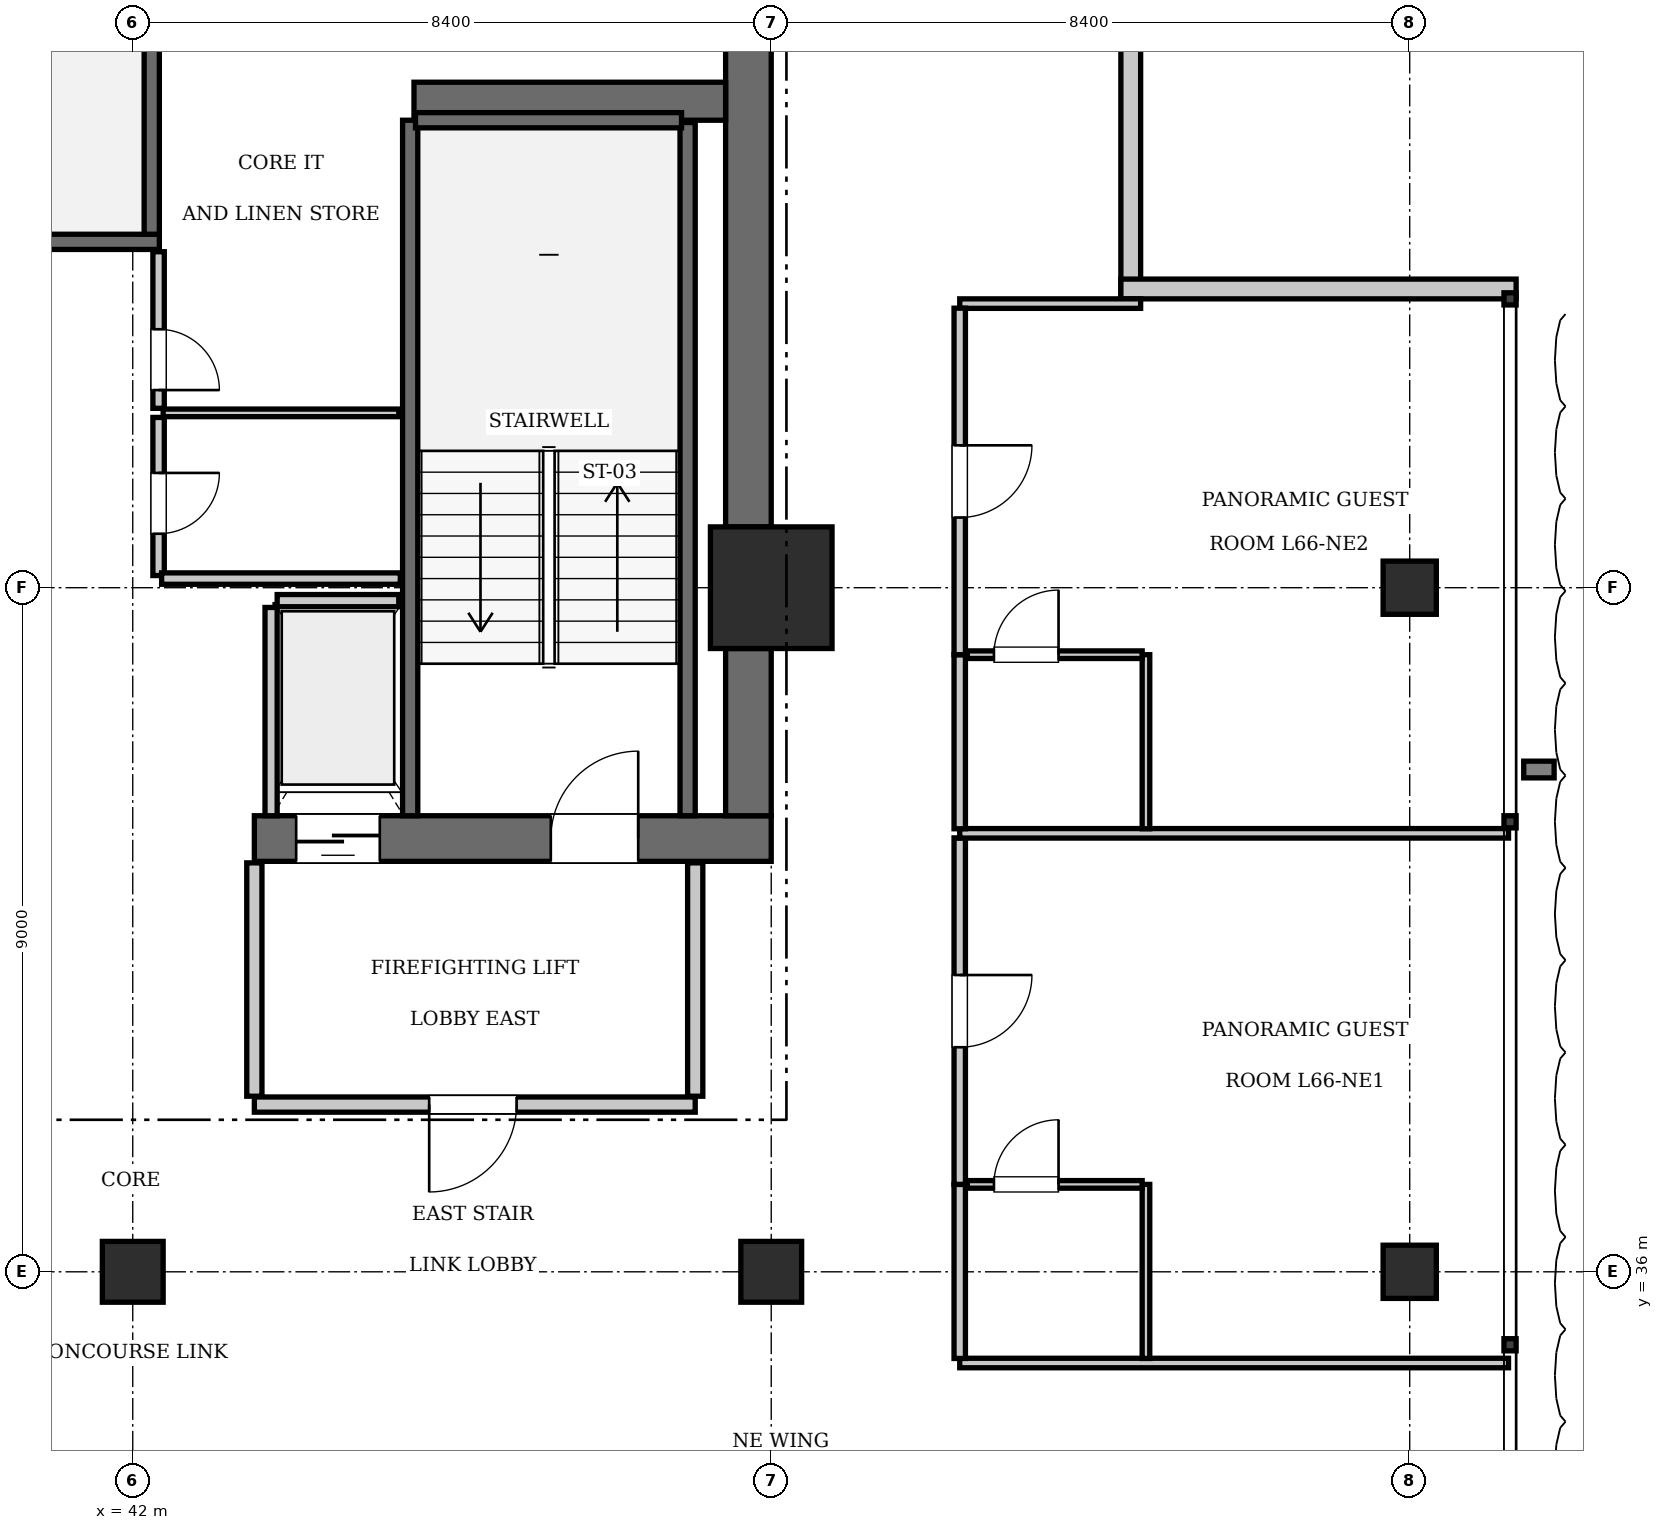
"""IFC4 building model, lengths in metres.
Left out: names, types, materials, properties, quantities, classifications, styles, units other than length and angle.
Written with IfcOpenShell. Run it as: python <this file> out.ifc"""

import sys

from ifc_helpers import new_model, si_unit, direction, frame, frame_2d, origin, origin_2d, place, context, subcontext, project, spatial, rectangle, extrude, element, fill, save


model = new_model("IFC4")
c1 = context("Model", 3, precision=1e-05, world=origin(), true_north=direction((0.0, 1.0)))
c2 = subcontext(c1, "Body", "Model", "MODEL_VIEW")
j1 = project(units=[si_unit("LENGTHUNIT", "METRE"), si_unit("PLANEANGLEUNIT", "RADIAN")], contexts=[c1])
p1 = place(None, origin())
s1 = spatial("IfcSite", under=j1, at=p1, CompositionType="ELEMENT")
p2 = place(p1, origin())
s2 = spatial("IfcBuilding", under=s1, at=p2, CompositionType="ELEMENT")
p3 = place(p2, frame((0.0, 0.0, 270.2)))
s3 = spatial("IfcBuildingStorey", under=s2, at=p3, CompositionType="ELEMENT", Elevation=270.2)
p4 = place(p3, frame((50.4, 45.0, 0.0), z_axis=(0.0, 0.0, 1.0), x_axis=(1.0, 0.0, 0.0)))
e1 = element("IfcColumn", 1, at=p4, inside=s3, PredefinedType="COLUMN", context=c2, shape_type="SweptSolid", body=[
    extrude(rectangle(XDim=1.6, YDim=1.6, at=origin_2d()), origin(), (0.0, 0.0, 1.0), 3.85),
])
p5 = place(p3, frame((43.6, 41.7, 0.0), z_axis=(0.0, 0.0, 1.0), x_axis=(1.0, 0.0, 0.0)))
e2 = element("IfcWall", 2, at=p5, inside=s3, PredefinedType="SHEAR", context=c2, shape_type="SweptSolid", body=[
    extrude(rectangle(XDim=6.8, YDim=0.6, at=frame_2d((3.4, 0.0))), origin(), (0.0, 0.0, 1.0), 3.85),
])
p6 = place(p5, frame((3.9, 0.0, 0.0)))
e3 = element("IfcOpeningElement", 3, at=p6, cuts=e2, PredefinedType="OPENING", context=c2, shape_type="SweptSolid", body=[
    extrude(rectangle(XDim=1.15, YDim=2.15, at=frame_2d((0.575, 1.075))), frame((0.0, 0.31, 0.0), z_axis=(0.0, -1.0, 0.0), x_axis=(1.0, 0.0, 0.0)), (0.0, 0.0, 1.0), 0.62),
])
p7 = place(p5, frame((0.55, 0.0, 0.0)))
e4 = element("IfcOpeningElement", 4, at=p7, cuts=e2, PredefinedType="OPENING", context=c2, shape_type="SweptSolid", body=[
    extrude(rectangle(XDim=1.1, YDim=2.2, at=frame_2d((0.55, 1.1))), frame((0.0, 0.31, 0.0), z_axis=(0.0, -1.0, 0.0), x_axis=(1.0, 0.0, 0.0)), (0.0, 0.0, 1.0), 0.62),
])
p8 = place(p3, frame((50.1, 42.0, 0.0), z_axis=(0.0, 0.0, 1.0), x_axis=(0.0, 1.0, 0.0)))
e5 = element("IfcWall", 5, at=p8, inside=s3, PredefinedType="SHEAR", context=c2, shape_type="SweptSolid", body=[
    extrude(rectangle(XDim=2.2, YDim=0.6, at=frame_2d((1.1, 0.0))), origin(), (0.0, 0.0, 1.0), 3.85),
])
p9 = place(p3, frame((50.1, 45.8, 0.0), z_axis=(0.0, 0.0, 1.0), x_axis=(0.0, 1.0, 0.0)))
e6 = element("IfcWall", 6, at=p9, inside=s3, PredefinedType="SHEAR", context=c2, shape_type="SweptSolid", body=[
    extrude(rectangle(XDim=7.6, YDim=0.6, at=frame_2d((3.8, 0.0))), origin(), (0.0, 0.0, 1.0), 3.85),
])
p10 = place(p3, frame((45.7, 51.4, 0.0), z_axis=(0.0, 0.0, 1.0), x_axis=(1.0, 0.0, 0.0)))
e7 = element("IfcWall", 7, at=p10, inside=s3, PredefinedType="SHEAR", context=c2, shape_type="SweptSolid", body=[
    extrude(rectangle(XDim=4.1, YDim=0.5, at=frame_2d((2.05, 0.0))), origin(), (0.0, 0.0, 1.0), 3.85),
])
for number, where, z_axis, x_axis in (
    (8, (42.0, 36.0, 0.0), (0.0, 0.0, 1.0), (1.0, 0.0, 0.0)),
    (9, (50.4, 36.0, 0.0), (0.0, 0.0, 1.0), (1.0, 0.0, 0.0)),
):
    element("IfcColumn", number, at=place(p3, frame(where, z_axis=z_axis, x_axis=x_axis)), inside=s3, PredefinedType="COLUMN", context=c2, shape_type="SweptSolid", body=[
        extrude(rectangle(XDim=0.8, YDim=0.8, at=origin_2d()), origin(), (0.0, 0.0, 1.0), 3.85),
    ])
for number, where, z_axis, x_axis in (
    (10, (58.8, 36.0, 0.0), (0.0, 0.0, 1.0), (1.0, 0.0, 0.0)),
    (11, (58.8, 45.0, 0.0), (0.0, 0.0, 1.0), (1.0, 0.0, 0.0)),
):
    element("IfcColumn", number, at=place(p3, frame(where, z_axis=z_axis, x_axis=x_axis)), inside=s3, PredefinedType="COLUMN", context=c2, shape_type="SweptSolid", body=[
        extrude(rectangle(XDim=0.7, YDim=0.7, at=origin_2d()), origin(), (0.0, 0.0, 1.0), 3.85),
    ])
p11 = place(p3, frame((33.25, 49.55, 0.0), z_axis=(0.0, 0.0, 1.0), x_axis=(1.0, 0.0, 0.0)))
e12 = element("IfcWall", 12, at=p11, inside=s3, PredefinedType="SOLIDWALL", context=c2, shape_type="SweptSolid", body=[
    extrude(rectangle(XDim=9.1, YDim=0.2, at=frame_2d((4.55, 0.0))), origin(), (0.0, 0.0, 1.0), 3.61),
])
p12 = place(p3, frame((42.25, 49.65, 0.0), z_axis=(0.0, 0.0, 1.0), x_axis=(0.0, 1.0, 0.0)))
e13 = element("IfcWall", 13, at=p12, inside=s3, PredefinedType="SOLIDWALL", context=c2, shape_type="SweptSolid", body=[
    extrude(rectangle(XDim=3.75, YDim=0.2, at=frame_2d((1.875, 0.0))), origin(), (0.0, 0.0, 1.0), 3.61),
])
p13 = place(p3, frame((45.65, 42.0, 0.0), z_axis=(0.0, 0.0, 1.0), x_axis=(0.0, 1.0, 0.0)))
e14 = element("IfcWall", 14, at=p13, inside=s3, PredefinedType="SOLIDWALL", context=c2, shape_type="SweptSolid", body=[
    extrude(rectangle(XDim=9.15, YDim=0.2, at=frame_2d((4.575, 0.0))), origin(), (0.0, 0.0, 1.0), 3.61),
])
p14 = place(p3, frame((49.3, 42.0, 0.0), z_axis=(0.0, 0.0, 1.0), x_axis=(0.0, 1.0, 0.0)))
e15 = element("IfcWall", 15, at=p14, inside=s3, PredefinedType="SOLIDWALL", context=c2, shape_type="SweptSolid", body=[
    extrude(rectangle(XDim=9.12, YDim=0.2, at=frame_2d((4.56, 0.0))), origin(), (0.0, 0.0, 1.0), 3.61),
])
p15 = place(p3, frame((45.72, 51.15, 0.0), z_axis=(0.0, 0.0, 1.0), x_axis=(1.0, 0.0, 0.0)))
e16 = element("IfcWall", 16, at=p15, inside=s3, PredefinedType="SOLIDWALL", context=c2, shape_type="SweptSolid", body=[
    extrude(rectangle(XDim=3.5, YDim=0.2, at=frame_2d((1.75, 0.0))), origin(), (0.0, 0.0, 1.0), 3.61),
])
p16 = place(p3, frame((43.9, 44.83, 0.0), z_axis=(0.0, 0.0, 1.0), x_axis=(1.0, 0.0, 0.0)))
e17 = element("IfcWall", 17, at=p16, inside=s3, PredefinedType="SOLIDWALL", context=c2, shape_type="SweptSolid", body=[
    extrude(rectangle(XDim=1.6, YDim=0.16, at=frame_2d((0.8, 0.0))), origin(), (0.0, 0.0, 1.0), 3.61),
])
p17 = place(p3, frame((43.82, 42.0, 0.0), z_axis=(0.0, 0.0, 1.0), x_axis=(0.0, 1.0, 0.0)))
e18 = element("IfcWall", 18, at=p17, inside=s3, PredefinedType="SOLIDWALL", context=c2, shape_type="SweptSolid", body=[
    extrude(rectangle(XDim=2.74, YDim=0.16, at=frame_2d((1.37, 0.0))), origin(), (0.0, 0.0, 1.0), 3.61),
])
for number, where, z_axis, x_axis in (
    (19, (55.13, 54.0, 0.0), (0.0, 0.0, 1.0), (0.0, -1.0, 0.0)),
    (20, (55.0, 48.93, 0.0), (0.0, 0.0, 1.0), (1.0, 0.0, 0.0)),
):
    element("IfcWall", number, at=place(p3, frame(where, z_axis=z_axis, x_axis=x_axis)), inside=s3, PredefinedType="SOLIDWALL", context=c2, shape_type="SweptSolid", body=[
        extrude(rectangle(XDim=5.2, YDim=0.26, at=frame_2d((2.6, 0.0))), origin(), (0.0, 0.0, 1.0), 3.61),
    ])
p18 = place(p3, frame((43.6, 38.2, 0.0), z_axis=(0.0, 0.0, 1.0), x_axis=(1.0, 0.0, 0.0)))
e21 = element("IfcWall", 21, at=p18, inside=s3, PredefinedType="PARTITIONING", context=c2, shape_type="SweptSolid", body=[
    extrude(rectangle(XDim=5.8, YDim=0.2, at=frame_2d((2.9, 0.0))), origin(), (0.0, 0.0, 1.0), 3.61),
])
p19 = place(p18, frame((2.3, 0.0, 0.0)))
e22 = element("IfcOpeningElement", 22, at=p19, cuts=e21, PredefinedType="OPENING", context=c2, shape_type="SweptSolid", body=[
    extrude(rectangle(XDim=1.15, YDim=2.15, at=frame_2d((0.575, 1.075))), frame((0.0, 0.11, 0.0), z_axis=(0.0, -1.0, 0.0), x_axis=(1.0, 0.0, 0.0)), (0.0, 0.0, 1.0), 0.22),
])
for number, where, z_axis, x_axis in (
    (23, (43.6, 38.31, 0.0), (0.0, 0.0, 1.0), (0.0, 1.0, 0.0)),
    (24, (49.4, 38.31, 0.0), (0.0, 0.0, 1.0), (0.0, 1.0, 0.0)),
):
    element("IfcWall", number, at=place(p3, frame(where, z_axis=z_axis, x_axis=x_axis)), inside=s3, PredefinedType="PARTITIONING", context=c2, shape_type="SweptSolid", body=[
        extrude(rectangle(XDim=3.07, YDim=0.2, at=frame_2d((1.535, 0.0))), origin(), (0.0, 0.0, 1.0), 3.61),
    ])
p20 = place(p3, frame((42.34, 45.16, 0.0), z_axis=(0.0, 0.0, 1.0), x_axis=(0.0, 1.0, 0.0)))
e25 = element("IfcWall", 25, at=p20, inside=s3, PredefinedType="PARTITIONING", context=c2, shape_type="SweptSolid", body=[
    extrude(rectangle(XDim=2.08, YDim=0.15, at=frame_2d((1.04, 0.0))), origin(), (0.0, 0.0, 1.0), 3.61),
])
p21 = place(p20, frame((0.55, 0.0, 0.0)))
e26 = element("IfcOpeningElement", 26, at=p21, cuts=e25, PredefinedType="OPENING", context=c2, shape_type="SweptSolid", body=[
    extrude(rectangle(XDim=0.8, YDim=2.05, at=frame_2d((0.4, 1.025))), frame((0.0, 0.085, 0.0), z_axis=(0.0, -1.0, 0.0), x_axis=(1.0, 0.0, 0.0)), (0.0, 0.0, 1.0), 0.17),
])
p22 = place(p3, frame((42.34, 47.36, 0.0), z_axis=(0.0, 0.0, 1.0), x_axis=(0.0, 1.0, 0.0)))
e27 = element("IfcWall", 27, at=p22, inside=s3, PredefinedType="PARTITIONING", context=c2, shape_type="SweptSolid", body=[
    extrude(rectangle(XDim=2.06, YDim=0.15, at=frame_2d((1.03, 0.0))), origin(), (0.0, 0.0, 1.0), 3.61),
])
p23 = place(p22, frame((0.24, 0.0, 0.0)))
e28 = element("IfcOpeningElement", 28, at=p23, cuts=e27, PredefinedType="OPENING", context=c2, shape_type="SweptSolid", body=[
    extrude(rectangle(XDim=0.8, YDim=2.05, at=frame_2d((0.4, 1.025))), frame((0.0, 0.085, 0.0), z_axis=(0.0, -1.0, 0.0), x_axis=(1.0, 0.0, 0.0)), (0.0, 0.0, 1.0), 0.17),
])
p24 = place(p3, frame((42.4, 47.3, 0.0), z_axis=(0.0, 0.0, 1.0), x_axis=(1.0, 0.0, 0.0)))
e29 = element("IfcWall", 29, at=p24, inside=s3, PredefinedType="PARTITIONING", context=c2, shape_type="SweptSolid", body=[
    extrude(rectangle(XDim=3.1, YDim=0.1, at=frame_2d((1.55, 0.0))), origin(), (0.0, 0.0, 1.0), 3.61),
])
p25 = place(p3, frame((42.38, 45.12, 0.0), z_axis=(0.0, 0.0, 1.0), x_axis=(1.0, 0.0, 0.0)))
e30 = element("IfcWall", 30, at=p25, inside=s3, PredefinedType="PARTITIONING", context=c2, shape_type="SweptSolid", body=[
    extrude(rectangle(XDim=3.14, YDim=0.15, at=frame_2d((1.57, 0.0))), origin(), (0.0, 0.0, 1.0), 3.61),
])
p26 = place(p3, frame((52.88, 34.8, 0.0), z_axis=(0.0, 0.0, 1.0), x_axis=(1.0, 0.0, 0.0)))
e31 = element("IfcWall", 31, at=p26, inside=s3, PredefinedType="PARTITIONING", context=c2, shape_type="SweptSolid", body=[
    extrude(rectangle(XDim=7.22, YDim=0.125, at=frame_2d((3.61, 0.0))), origin(), (0.0, 0.0, 1.0), 3.61),
])
p27 = place(p3, frame((52.88, 48.738, 0.0), z_axis=(0.0, 0.0, 1.0), x_axis=(1.0, 0.0, 0.0)))
e32 = element("IfcWall", 32, at=p27, inside=s3, PredefinedType="PARTITIONING", context=c2, shape_type="SweptSolid", body=[
    extrude(rectangle(XDim=2.38, YDim=0.125, at=frame_2d((1.19, 0.0))), origin(), (0.0, 0.0, 1.0), 3.61),
])
p28 = place(p3, frame((52.88, 34.86, 0.0), z_axis=(0.0, 0.0, 1.0), x_axis=(0.0, 1.0, 0.0)))
e33 = element("IfcWall", 33, at=p28, inside=s3, PredefinedType="PARTITIONING", context=c2, shape_type="SweptSolid", body=[
    extrude(rectangle(XDim=2.29, YDim=0.15, at=frame_2d((1.145, 0.0))), origin(), (0.0, 0.0, 1.0), 3.61),
])
p29 = place(p3, frame((52.88, 37.15, 0.0), z_axis=(0.0, 0.0, 1.0), x_axis=(0.0, 1.0, 0.0)))
e34 = element("IfcWall", 34, at=p29, inside=s3, PredefinedType="PARTITIONING", context=c2, shape_type="SweptSolid", body=[
    extrude(rectangle(XDim=4.559, YDim=0.15, at=frame_2d((2.279, 0.0))), origin(), (0.0, 0.0, 1.0), 3.61),
])
p30 = place(p29, frame((1.804, 0.0, 0.0)))
e35 = element("IfcOpeningElement", 35, at=p30, cuts=e34, PredefinedType="OPENING", context=c2, shape_type="SweptSolid", body=[
    extrude(rectangle(XDim=0.95, YDim=2.15, at=frame_2d((0.475, 1.075))), frame((0.0, 0.085, 0.0), z_axis=(0.0, -1.0, 0.0), x_axis=(1.0, 0.0, 0.0)), (0.0, 0.0, 1.0), 0.17),
])
p31 = place(p3, frame((55.33, 34.86, 0.0), z_axis=(0.0, 0.0, 1.0), x_axis=(0.0, 1.0, 0.0)))
e36 = element("IfcWall", 36, at=p31, inside=s3, PredefinedType="PARTITIONING", context=c2, shape_type="SweptSolid", body=[
    extrude(rectangle(XDim=2.29, YDim=0.1, at=frame_2d((1.145, 0.0))), origin(), (0.0, 0.0, 1.0), 3.61),
])
p32 = place(p3, frame((52.98, 37.15, 0.0), z_axis=(0.0, 0.0, 1.0), x_axis=(1.0, 0.0, 0.0)))
e37 = element("IfcWall", 37, at=p32, inside=s3, PredefinedType="PARTITIONING", context=c2, shape_type="SweptSolid", body=[
    extrude(rectangle(XDim=2.3, YDim=0.1, at=frame_2d((1.15, 0.0))), origin(), (0.0, 0.0, 1.0), 3.61),
])
p33 = place(p32, frame((0.35, 0.0, 0.0)))
e38 = element("IfcOpeningElement", 38, at=p33, cuts=e37, PredefinedType="OPENING", context=c2, shape_type="SweptSolid", body=[
    extrude(rectangle(XDim=0.85, YDim=2.1, at=frame_2d((0.425, 1.05))), frame((0.0, 0.06, 0.0), z_axis=(0.0, -1.0, 0.0), x_axis=(1.0, 0.0, 0.0)), (0.0, 0.0, 1.0), 0.12),
])
p34 = place(p3, frame((52.88, 41.769, 0.0), z_axis=(0.0, 0.0, 1.0), x_axis=(1.0, 0.0, 0.0)))
e39 = element("IfcWall", 39, at=p34, inside=s3, PredefinedType="PARTITIONING", context=c2, shape_type="SweptSolid", body=[
    extrude(rectangle(XDim=7.22, YDim=0.125, at=frame_2d((3.61, 0.0))), origin(), (0.0, 0.0, 1.0), 3.61),
])
p35 = place(p3, frame((52.88, 41.829, 0.0), z_axis=(0.0, 0.0, 1.0), x_axis=(0.0, 1.0, 0.0)))
e40 = element("IfcWall", 40, at=p35, inside=s3, PredefinedType="PARTITIONING", context=c2, shape_type="SweptSolid", body=[
    extrude(rectangle(XDim=2.29, YDim=0.15, at=frame_2d((1.145, 0.0))), origin(), (0.0, 0.0, 1.0), 3.61),
])
p36 = place(p3, frame((52.88, 44.119, 0.0), z_axis=(0.0, 0.0, 1.0), x_axis=(0.0, 1.0, 0.0)))
e41 = element("IfcWall", 41, at=p36, inside=s3, PredefinedType="PARTITIONING", context=c2, shape_type="SweptSolid", body=[
    extrude(rectangle(XDim=4.559, YDim=0.15, at=frame_2d((2.279, 0.0))), origin(), (0.0, 0.0, 1.0), 3.61),
])
p37 = place(p36, frame((1.804, 0.0, 0.0)))
e42 = element("IfcOpeningElement", 42, at=p37, cuts=e41, PredefinedType="OPENING", context=c2, shape_type="SweptSolid", body=[
    extrude(rectangle(XDim=0.95, YDim=2.15, at=frame_2d((0.475, 1.075))), frame((0.0, 0.085, 0.0), z_axis=(0.0, -1.0, 0.0), x_axis=(1.0, 0.0, 0.0)), (0.0, 0.0, 1.0), 0.17),
])
p38 = place(p3, frame((55.33, 41.829, 0.0), z_axis=(0.0, 0.0, 1.0), x_axis=(0.0, 1.0, 0.0)))
e43 = element("IfcWall", 43, at=p38, inside=s3, PredefinedType="PARTITIONING", context=c2, shape_type="SweptSolid", body=[
    extrude(rectangle(XDim=2.29, YDim=0.1, at=frame_2d((1.145, 0.0))), origin(), (0.0, 0.0, 1.0), 3.61),
])
p39 = place(p3, frame((52.98, 44.119, 0.0), z_axis=(0.0, 0.0, 1.0), x_axis=(1.0, 0.0, 0.0)))
e44 = element("IfcWall", 44, at=p39, inside=s3, PredefinedType="PARTITIONING", context=c2, shape_type="SweptSolid", body=[
    extrude(rectangle(XDim=2.3, YDim=0.1, at=frame_2d((1.15, 0.0))), origin(), (0.0, 0.0, 1.0), 3.61),
])
p40 = place(p39, frame((0.35, 0.0, 0.0)))
e45 = element("IfcOpeningElement", 45, at=p40, cuts=e44, PredefinedType="OPENING", context=c2, shape_type="SweptSolid", body=[
    extrude(rectangle(XDim=0.85, YDim=2.1, at=frame_2d((0.425, 1.05))), frame((0.0, 0.06, 0.0), z_axis=(0.0, -1.0, 0.0), x_axis=(1.0, 0.0, 0.0)), (0.0, 0.0, 1.0), 0.12),
])
p41 = place(p6, origin())
e46 = element("IfcDoor", 46, at=p41, inside=s3, OperationType="SINGLE_SWING_RIGHT", PredefinedType="DOOR", context=c2, shape_type="SweptSolid", body=[
    extrude(rectangle(XDim=1.15, YDim=2.15, at=frame_2d((0.575, 1.075))), frame((0.0, 0.025, 0.0), z_axis=(0.0, -1.0, 0.0), x_axis=(1.0, 0.0, 0.0)), (0.0, 0.0, 1.0), 0.05),
])
fill(e3, e46)
p42 = place(p7, frame((1.1, 0.0, 0.0), z_axis=(0.0, 0.0, 1.0), x_axis=(-1.0, 0.0, 0.0)))
e47 = element("IfcDoor", 47, at=p42, inside=s3, OperationType="SLIDING_TO_LEFT", PredefinedType="DOOR", context=c2, shape_type="SweptSolid", body=[
    extrude(rectangle(XDim=1.1, YDim=2.2, at=frame_2d((0.55, 1.1))), frame((0.0, 0.025, 0.0), z_axis=(0.0, -1.0, 0.0), x_axis=(1.0, 0.0, 0.0)), (0.0, 0.0, 1.0), 0.05),
])
fill(e4, e47)
p43 = place(p19, frame((1.15, 0.0, 0.0), z_axis=(0.0, 0.0, 1.0), x_axis=(-1.0, 0.0, 0.0)))
e48 = element("IfcDoor", 48, at=p43, inside=s3, OperationType="SINGLE_SWING_RIGHT", PredefinedType="DOOR", context=c2, shape_type="SweptSolid", body=[
    extrude(rectangle(XDim=1.15, YDim=2.15, at=frame_2d((0.575, 1.075))), frame((0.0, 0.025, 0.0), z_axis=(0.0, -1.0, 0.0), x_axis=(1.0, 0.0, 0.0)), (0.0, 0.0, 1.0), 0.05),
])
fill(e22, e48)
p44 = place(p21, frame((0.8, 0.0, 0.0), z_axis=(0.0, 0.0, 1.0), x_axis=(-1.0, 0.0, 0.0)))
e49 = element("IfcDoor", 49, at=p44, inside=s3, OperationType="SINGLE_SWING_LEFT", PredefinedType="DOOR", context=c2, shape_type="SweptSolid", body=[
    extrude(rectangle(XDim=0.8, YDim=2.05, at=frame_2d((0.4, 1.025))), frame((0.0, 0.025, 0.0), z_axis=(0.0, -1.0, 0.0), x_axis=(1.0, 0.0, 0.0)), (0.0, 0.0, 1.0), 0.05),
])
fill(e26, e49)
p45 = place(p23, frame((0.8, 0.0, 0.0), z_axis=(0.0, 0.0, 1.0), x_axis=(-1.0, 0.0, 0.0)))
e50 = element("IfcDoor", 50, at=p45, inside=s3, OperationType="SINGLE_SWING_RIGHT", PredefinedType="DOOR", context=c2, shape_type="SweptSolid", body=[
    extrude(rectangle(XDim=0.8, YDim=2.05, at=frame_2d((0.4, 1.025))), frame((0.0, 0.025, 0.0), z_axis=(0.0, -1.0, 0.0), x_axis=(1.0, 0.0, 0.0)), (0.0, 0.0, 1.0), 0.05),
])
fill(e28, e50)
p46 = place(p33, origin())
e51 = element("IfcDoor", 51, at=p46, inside=s3, OperationType="SINGLE_SWING_RIGHT", PredefinedType="DOOR", context=c2, shape_type="SweptSolid", body=[
    extrude(rectangle(XDim=0.85, YDim=2.1, at=frame_2d((0.425, 1.05))), frame((0.0, 0.025, 0.0), z_axis=(0.0, -1.0, 0.0), x_axis=(1.0, 0.0, 0.0)), (0.0, 0.0, 1.0), 0.05),
])
fill(e38, e51)
p47 = place(p30, frame((0.95, 0.0, 0.0), z_axis=(0.0, 0.0, 1.0), x_axis=(-1.0, 0.0, 0.0)))
e52 = element("IfcDoor", 52, at=p47, inside=s3, OperationType="SINGLE_SWING_LEFT", PredefinedType="DOOR", context=c2, shape_type="SweptSolid", body=[
    extrude(rectangle(XDim=0.95, YDim=2.15, at=frame_2d((0.475, 1.075))), frame((0.0, 0.025, 0.0), z_axis=(0.0, -1.0, 0.0), x_axis=(1.0, 0.0, 0.0)), (0.0, 0.0, 1.0), 0.05),
])
fill(e35, e52)
p48 = place(p40, origin())
e53 = element("IfcDoor", 53, at=p48, inside=s3, OperationType="SINGLE_SWING_RIGHT", PredefinedType="DOOR", context=c2, shape_type="SweptSolid", body=[
    extrude(rectangle(XDim=0.85, YDim=2.1, at=frame_2d((0.425, 1.05))), frame((0.0, 0.025, 0.0), z_axis=(0.0, -1.0, 0.0), x_axis=(1.0, 0.0, 0.0)), (0.0, 0.0, 1.0), 0.05),
])
fill(e45, e53)
p49 = place(p37, frame((0.95, 0.0, 0.0), z_axis=(0.0, 0.0, 1.0), x_axis=(-1.0, 0.0, 0.0)))
e54 = element("IfcDoor", 54, at=p49, inside=s3, OperationType="SINGLE_SWING_LEFT", PredefinedType="DOOR", context=c2, shape_type="SweptSolid", body=[
    extrude(rectangle(XDim=0.95, YDim=2.15, at=frame_2d((0.475, 1.075))), frame((0.0, 0.025, 0.0), z_axis=(0.0, -1.0, 0.0), x_axis=(1.0, 0.0, 0.0)), (0.0, 0.0, 1.0), 0.05),
])
fill(e42, e54)
save(model, sys.argv[1])
